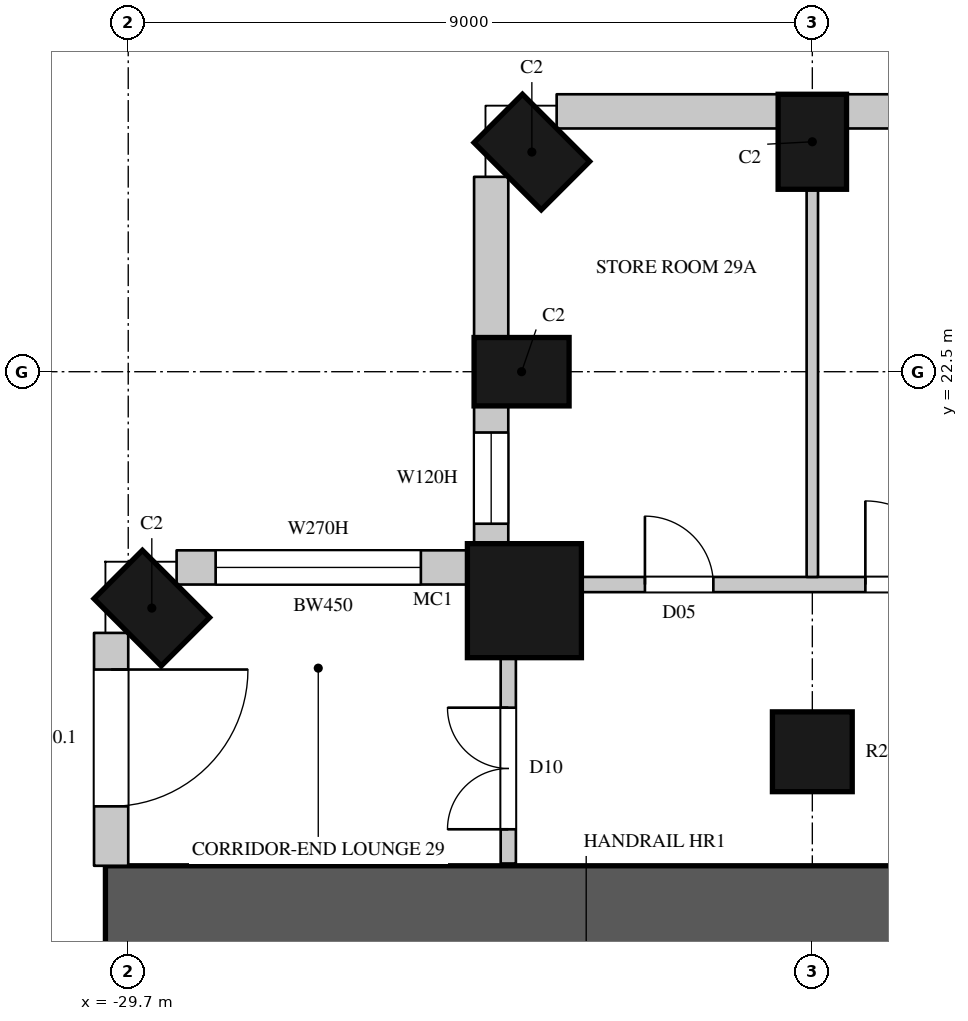
"""IFC4 building model, lengths in metres.
Left out: names, types, materials, properties, quantities, classifications, styles, units other than length and angle.
Written with IfcOpenShell. Run it as: python <this file> out.ifc"""

import sys

from ifc_helpers import new_model, si_unit, direction, frame, frame_2d, origin, origin_2d, place, context, subcontext, project, spatial, rectangle, circle, extrude, element, fill, save


model = new_model("IFC4")
c1 = context("Model", 3, precision=1e-05, world=origin(), true_north=direction((0.0, 1.0)))
c2 = subcontext(c1, "Body", "Model", "MODEL_VIEW")
j1 = project(units=[si_unit("LENGTHUNIT", "METRE"), si_unit("PLANEANGLEUNIT", "RADIAN")], contexts=[c1])
p1 = place(None, origin())
s1 = spatial("IfcSite", under=j1, at=p1, CompositionType="ELEMENT")
p2 = place(p1, origin())
s2 = spatial("IfcBuilding", under=s1, at=p2, CompositionType="ELEMENT")
p3 = place(p2, frame((0.0, 0.0, 134.7)))
s3 = spatial("IfcBuildingStorey", under=s2, at=p3, CompositionType="ELEMENT", Elevation=134.7)
for number, where, z_axis, x_axis in (
    (1, (-29.39, 19.39, 0.0), (0.0, 0.0, 1.0), (-0.707, -0.707, 0.0)),
    (2, (-20.7, 25.525, 0.0), (0.0, 0.0, 1.0), (-1.0, 0.0, 0.0)),
    (3, (-24.39, 25.39, 0.0), (0.0, 0.0, 1.0), (-0.707, -0.707, 0.0)),
    (4, (-24.525, 22.5, 0.0), (0.0, 0.0, 1.0), (0.0, -1.0, 0.0)),
):
    element("IfcColumn", number, at=place(p3, frame(where, z_axis=z_axis, x_axis=x_axis)), inside=s3, PredefinedType="COLUMN", context=c2, shape_type="SweptSolid", body=[
        extrude(rectangle(XDim=0.9, YDim=1.25, at=origin_2d()), origin(), (0.0, 0.0, 1.0), 3.6),
    ])
p4 = place(p3, frame((-24.488, 19.488, 0.0), z_axis=(0.0, 0.0, 1.0), x_axis=(1.0, 0.0, 0.0)))
e5 = element("IfcColumn", 5, at=p4, inside=s3, PredefinedType="COLUMN", context=c2, shape_type="SweptSolid", body=[
    extrude(circle(Radius=0.75, at=origin_2d()), origin(), (0.0, 0.0, 1.0), 3.6),
])
p5 = place(p3, frame((-20.7, 17.5, 0.0), z_axis=(0.0, 0.0, 1.0), x_axis=(1.0, 0.0, 0.0)))
e6 = element("IfcColumn", 6, at=p5, inside=s3, PredefinedType="COLUMN", context=c2, shape_type="SweptSolid", body=[
    extrude(circle(Radius=0.525, at=origin_2d()), origin(), (0.0, 0.0, 1.0), 3.6),
])
p6 = place(p3, frame((-29.925, 19.064, 0.0), z_axis=(0.0, 0.0, 1.0), x_axis=(0.0, -1.0, 0.0)))
e7 = element("IfcWall", 7, at=p6, inside=s3, PredefinedType="SOLIDWALL", context=c2, shape_type="SweptSolid", body=[
    extrude(rectangle(XDim=3.064, YDim=0.45, at=frame_2d((1.532, 0.0))), origin(), (0.0, 0.0, 1.0), 3.3),
])
p7 = place(p6, frame((0.482, 0.0, 0.0)))
e8 = element("IfcOpeningElement", 8, at=p7, cuts=e7, PredefinedType="OPENING", context=c2, shape_type="SweptSolid", body=[
    extrude(rectangle(XDim=1.8, YDim=2.4, at=frame_2d((0.9, 1.2))), frame((0.0, 0.235, 0.0), z_axis=(0.0, -1.0, 0.0), x_axis=(1.0, 0.0, 0.0)), (0.0, 0.0, 1.0), 0.47),
])
p8 = place(p3, frame((-12.15, 25.925, 0.0), z_axis=(0.0, 0.0, 1.0), x_axis=(-1.0, 0.0, 0.0)))
e9 = element("IfcWall", 9, at=p8, inside=s3, PredefinedType="SOLIDWALL", context=c2, shape_type="SweptSolid", body=[
    extrude(rectangle(XDim=8.1, YDim=0.45, at=frame_2d((4.05, 0.0))), origin(), (0.0, 0.0, 1.0), 3.3),
])
p9 = place(p8, frame((0.2, 0.0, 0.0)))
e10 = element("IfcOpeningElement", 10, at=p9, cuts=e9, PredefinedType="OPENING", context=c2, shape_type="SweptSolid", body=[
    extrude(rectangle(XDim=1.8, YDim=2.4, at=frame_2d((0.9, 1.2))), frame((0.0, 0.235, 0.0), z_axis=(0.0, -1.0, 0.0), x_axis=(1.0, 0.0, 0.0)), (0.0, 0.0, 1.0), 0.47),
])
p10 = place(p8, frame((2.2, 0.0, 1.05)))
e11 = element("IfcOpeningElement", 11, at=p10, cuts=e9, PredefinedType="OPENING", context=c2, shape_type="SweptSolid", body=[
    extrude(rectangle(XDim=1.2, YDim=2.0, at=frame_2d((0.6, 1.0))), frame((0.0, 0.235, 0.0), z_axis=(0.0, -1.0, 0.0), x_axis=(1.0, 0.0, 0.0)), (0.0, 0.0, 1.0), 0.47),
])
p11 = place(p8, frame((5.4, 0.0, 0.0)))
e12 = element("IfcOpeningElement", 12, at=p11, cuts=e9, PredefinedType="OPENING", context=c2, shape_type="SweptSolid", body=[
    extrude(rectangle(XDim=1.8, YDim=2.4, at=frame_2d((0.9, 1.2))), frame((0.0, 0.235, 0.0), z_axis=(0.0, -1.0, 0.0), x_axis=(1.0, 0.0, 0.0)), (0.0, 0.0, 1.0), 0.47),
])
p12 = place(p3, frame((-21.15, 25.925, 0.0), z_axis=(0.0, 0.0, 1.0), x_axis=(-1.0, 0.0, 0.0)))
e13 = element("IfcWall", 13, at=p12, inside=s3, PredefinedType="SOLIDWALL", context=c2, shape_type="SweptSolid", body=[
    extrude(rectangle(XDim=2.914, YDim=0.45, at=frame_2d((1.457, 0.0))), origin(), (0.0, 0.0, 1.0), 3.3),
])
p13 = place(p3, frame((-24.925, 25.064, 0.0), z_axis=(0.0, 0.0, 1.0), x_axis=(0.0, -1.0, 0.0)))
e14 = element("IfcWall", 14, at=p13, inside=s3, PredefinedType="SOLIDWALL", context=c2, shape_type="SweptSolid", body=[
    extrude(rectangle(XDim=2.114, YDim=0.45, at=frame_2d((1.057, 0.0))), origin(), (0.0, 0.0, 1.0), 3.3),
])
p14 = place(p3, frame((-24.925, 22.05, 0.0), z_axis=(0.0, 0.0, 1.0), x_axis=(0.0, -1.0, 0.0)))
e15 = element("IfcWall", 15, at=p14, inside=s3, PredefinedType="SOLIDWALL", context=c2, shape_type="SweptSolid", body=[
    extrude(rectangle(XDim=1.843, YDim=0.45, at=frame_2d((0.921, 0.0))), origin(), (0.0, 0.0, 1.0), 3.3),
])
p15 = place(p14, frame((0.35, 0.0, 1.05)))
e16 = element("IfcOpeningElement", 16, at=p15, cuts=e15, PredefinedType="OPENING", context=c2, shape_type="SweptSolid", body=[
    extrude(rectangle(XDim=1.2, YDim=2.0, at=frame_2d((0.6, 1.0))), frame((0.0, 0.235, 0.0), z_axis=(0.0, -1.0, 0.0), x_axis=(1.0, 0.0, 0.0)), (0.0, 0.0, 1.0), 0.47),
])
p16 = place(p3, frame((-25.207, 19.925, 0.0), z_axis=(0.0, 0.0, 1.0), x_axis=(-1.0, 0.0, 0.0)))
e17 = element("IfcWall", 17, at=p16, inside=s3, PredefinedType="SOLIDWALL", context=c2, shape_type="SweptSolid", body=[
    extrude(rectangle(XDim=3.857, YDim=0.45, at=frame_2d((1.928, 0.0))), origin(), (0.0, 0.0, 1.0), 3.3),
])
p17 = place(p16, frame((0.643, 0.0, 1.05)))
e18 = element("IfcOpeningElement", 18, at=p17, cuts=e17, PredefinedType="OPENING", context=c2, shape_type="SweptSolid", body=[
    extrude(rectangle(XDim=2.7, YDim=2.0, at=frame_2d((1.35, 1.0))), frame((0.0, 0.235, 0.0), z_axis=(0.0, -1.0, 0.0), x_axis=(1.0, 0.0, 0.0)), (0.0, 0.0, 1.0), 0.47),
])
p18 = place(p3, frame((-30.0, 15.4, 0.0), z_axis=(0.0, 0.0, 1.0), x_axis=(1.0, 0.0, 0.0)))
e19 = element("IfcWall", 19, at=p18, inside=s3, PredefinedType="SHEAR", context=c2, shape_type="SweptSolid", body=[
    extrude(rectangle(XDim=16.0, YDim=1.2, at=frame_2d((8.0, 0.0))), origin(), (0.0, 0.0, 1.0), 3.6),
])
p19 = place(p18, frame((13.4, 0.0, 0.0)))
e20 = element("IfcOpeningElement", 20, at=p19, cuts=e19, PredefinedType="OPENING", context=c2, shape_type="SweptSolid", body=[
    extrude(rectangle(XDim=1.5, YDim=2.4, at=frame_2d((0.75, 1.2))), frame((0.0, 0.61, 0.0), z_axis=(0.0, -1.0, 0.0), x_axis=(1.0, 0.0, 0.0)), (0.0, 0.0, 1.0), 1.22),
])
p20 = place(p3, frame((-24.7, 16.03, 0.0), z_axis=(0.0, 0.0, 1.0), x_axis=(0.0, 1.0, 0.0)))
e21 = element("IfcWall", 21, at=p20, inside=s3, PredefinedType="PARTITIONING", context=c2, shape_type="SweptSolid", body=[
    extrude(rectangle(XDim=2.722, YDim=0.2, at=frame_2d((1.361, 0.0))), origin(), (0.0, 0.0, 1.0), 3.3),
])
p21 = place(p20, frame((0.45, 0.0, 0.0)))
e22 = element("IfcOpeningElement", 22, at=p21, cuts=e21, PredefinedType="OPENING", context=c2, shape_type="SweptSolid", body=[
    extrude(rectangle(XDim=1.6, YDim=2.4, at=frame_2d((0.8, 1.2))), frame((0.0, 0.11, 0.0), z_axis=(0.0, -1.0, 0.0), x_axis=(1.0, 0.0, 0.0)), (0.0, 0.0, 1.0), 0.22),
])
p22 = place(p3, frame((-23.752, 19.7, 0.0), z_axis=(0.0, 0.0, 1.0), x_axis=(1.0, 0.0, 0.0)))
e23 = element("IfcWall", 23, at=p22, inside=s3, PredefinedType="PARTITIONING", context=c2, shape_type="SweptSolid", body=[
    extrude(rectangle(XDim=5.152, YDim=0.2, at=frame_2d((2.576, 0.0))), origin(), (0.0, 0.0, 1.0), 3.3),
])
p23 = place(p22, frame((0.85, 0.0, 0.0)))
e24 = element("IfcOpeningElement", 24, at=p23, cuts=e23, PredefinedType="OPENING", context=c2, shape_type="SweptSolid", body=[
    extrude(rectangle(XDim=0.9, YDim=2.2, at=frame_2d((0.45, 1.1))), frame((0.0, 0.11, 0.0), z_axis=(0.0, -1.0, 0.0), x_axis=(1.0, 0.0, 0.0)), (0.0, 0.0, 1.0), 0.22),
])
p24 = place(p22, frame((3.75, 0.0, 0.0)))
e25 = element("IfcOpeningElement", 25, at=p24, cuts=e23, PredefinedType="OPENING", context=c2, shape_type="SweptSolid", body=[
    extrude(rectangle(XDim=1.1, YDim=2.4, at=frame_2d((0.55, 1.2))), frame((0.0, 0.11, 0.0), z_axis=(0.0, -1.0, 0.0), x_axis=(1.0, 0.0, 0.0)), (0.0, 0.0, 1.0), 0.22),
])
p25 = place(p3, frame((-20.7, 19.8, 0.0), z_axis=(0.0, 0.0, 1.0), x_axis=(0.0, 1.0, 0.0)))
e26 = element("IfcWall", 26, at=p25, inside=s3, PredefinedType="PARTITIONING", context=c2, shape_type="SweptSolid", body=[
    extrude(rectangle(XDim=5.1, YDim=0.15, at=frame_2d((2.55, 0.0))), origin(), (0.0, 0.0, 1.0), 2.75),
])
p26 = place(p7, origin())
e27 = element("IfcDoor", 27, at=p26, inside=s3, OperationType="SLIDING_TO_LEFT", PredefinedType="DOOR", context=c2, shape_type="SweptSolid", body=[
    extrude(rectangle(XDim=1.8, YDim=2.4, at=frame_2d((0.9, 1.2))), frame((0.0, 0.13, 0.0), z_axis=(0.0, -1.0, 0.0), x_axis=(1.0, 0.0, 0.0)), (0.0, 0.0, 1.0), 0.05),
])
fill(e8, e27)
p27 = place(p15, origin())
e28 = element("IfcWindow", 28, at=p27, inside=s3, PartitioningType="SINGLE_PANEL", PredefinedType="WINDOW", context=c2, shape_type="SweptSolid", body=[
    extrude(rectangle(XDim=1.2, YDim=2.0, at=frame_2d((0.6, 1.0))), frame((0.0, 0.135, 0.0), z_axis=(0.0, -1.0, 0.0), x_axis=(1.0, 0.0, 0.0)), (0.0, 0.0, 1.0), 0.06),
])
fill(e16, e28)
p28 = place(p17, origin())
e29 = element("IfcWindow", 29, at=p28, inside=s3, PartitioningType="SINGLE_PANEL", PredefinedType="WINDOW", context=c2, shape_type="SweptSolid", body=[
    extrude(rectangle(XDim=2.7, YDim=2.0, at=frame_2d((1.35, 1.0))), frame((0.0, 0.135, 0.0), z_axis=(0.0, -1.0, 0.0), x_axis=(1.0, 0.0, 0.0)), (0.0, 0.0, 1.0), 0.06),
])
fill(e18, e29)
p29 = place(p23, origin())
e30 = element("IfcDoor", 30, at=p29, inside=s3, OperationType="SINGLE_SWING_LEFT", PredefinedType="DOOR", context=c2, shape_type="SweptSolid", body=[
    extrude(rectangle(XDim=0.9, YDim=2.2, at=frame_2d((0.45, 1.1))), frame((0.0, 0.025, 0.0), z_axis=(0.0, -1.0, 0.0), x_axis=(1.0, 0.0, 0.0)), (0.0, 0.0, 1.0), 0.05),
])
fill(e24, e30)
p30 = place(p21, origin())
e31 = element("IfcDoor", 31, at=p30, inside=s3, OperationType="DOUBLE_DOOR_SINGLE_SWING", PredefinedType="DOOR", context=c2, shape_type="SweptSolid", body=[
    extrude(rectangle(XDim=1.6, YDim=2.4, at=frame_2d((0.8, 1.2))), frame((0.0, 0.025, 0.0), z_axis=(0.0, -1.0, 0.0), x_axis=(1.0, 0.0, 0.0)), (0.0, 0.0, 1.0), 0.05),
])
fill(e22, e31)
p31 = place(p24, origin())
e32 = element("IfcDoor", 32, at=p31, inside=s3, OperationType="SINGLE_SWING_LEFT", PredefinedType="DOOR", context=c2, shape_type="SweptSolid", body=[
    extrude(rectangle(XDim=1.1, YDim=2.4, at=frame_2d((0.55, 1.2))), frame((0.0, 0.025, 0.0), z_axis=(0.0, -1.0, 0.0), x_axis=(1.0, 0.0, 0.0)), (0.0, 0.0, 1.0), 0.05),
])
fill(e25, e32)
save(model, sys.argv[1])
